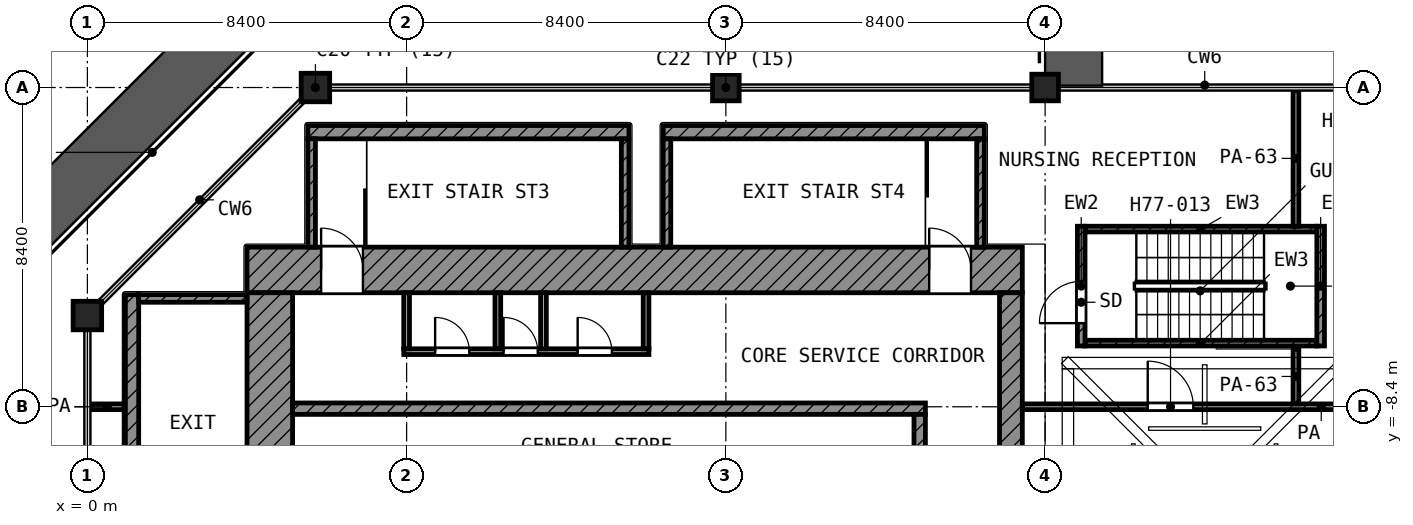
"""IFC4 building model, lengths in metres.
Left out: names, types, materials, properties, quantities, classifications, styles, units other than length and angle.
Written with IfcOpenShell. Run it as: python <this file> out.ifc"""

import sys

from ifc_helpers import new_model, si_unit, direction, frame, frame_2d, origin, origin_2d, place, context, subcontext, project, spatial, rectangle, extrude, element, fill, save


model = new_model("IFC4")
c1 = context("Model", 3, precision=1e-05, world=origin(), true_north=direction((0.0, 1.0)))
c2 = subcontext(c1, "Body", "Model", "MODEL_VIEW")
j1 = project(units=[si_unit("LENGTHUNIT", "METRE"), si_unit("PLANEANGLEUNIT", "RADIAN")], contexts=[c1])
p1 = place(None, origin())
s1 = spatial("IfcSite", under=j1, at=p1, CompositionType="ELEMENT")
p2 = place(p1, origin())
s2 = spatial("IfcBuilding", under=s1, at=p2, CompositionType="ELEMENT")
p3 = place(p2, frame((0.0, 0.0, 332.2)))
s3 = spatial("IfcBuildingStorey", under=s2, at=p3, CompositionType="ELEMENT", Elevation=332.2)
p4 = place(p3, frame((6.0, 0.0, 0.0), z_axis=(0.0, 0.0, 1.0), x_axis=(1.0, 0.0, 0.0)))
e1 = element("IfcColumn", 1, at=p4, inside=s3, PredefinedType="COLUMN", context=c2, shape_type="SweptSolid", body=[
    extrude(rectangle(XDim=0.75, YDim=0.75, at=origin_2d()), origin(), (0.0, 0.0, 1.0), 4.5),
])
for number, where, z_axis, x_axis in (
    (2, (16.8, 0.0, 0.0), (0.0, 0.0, 1.0), (1.0, 0.0, 0.0)),
    (3, (25.2, 0.0, 0.0), (0.0, 0.0, 1.0), (1.0, 0.0, 0.0)),
):
    element("IfcColumn", number, at=place(p3, frame(where, z_axis=z_axis, x_axis=x_axis)), inside=s3, PredefinedType="COLUMN", context=c2, shape_type="SweptSolid", body=[
        extrude(rectangle(XDim=0.7, YDim=0.7, at=origin_2d()), origin(), (0.0, 0.0, 1.0), 4.5),
    ])
p5 = place(p3, frame((0.0, -6.0, 0.0), z_axis=(0.0, 0.0, 1.0), x_axis=(1.0, 0.0, 0.0)))
e4 = element("IfcColumn", 4, at=p5, inside=s3, PredefinedType="COLUMN", context=c2, shape_type="SweptSolid", body=[
    extrude(rectangle(XDim=0.75, YDim=0.75, at=origin_2d()), origin(), (0.0, 0.0, 1.0), 4.5),
])
p6 = place(p3, frame((25.375, -0.125, 4.5), z_axis=(0.0, 0.0, 1.0), x_axis=(1.0, 0.0, 0.0)))
e5 = element("IfcWall", 5, at=p6, inside=s3, PredefinedType="SOLIDWALL", context=c2, shape_type="SweptSolid", body=[
    extrude(rectangle(XDim=13.853, YDim=0.25, at=frame_2d((6.926, 0.0))), origin(), (0.0, 0.0, 1.0), 1.1),
])
p7 = place(p3, frame((25.05, 0.683, 4.5), z_axis=(0.0, 0.0, 1.0), x_axis=(0.0, -1.0, 0.0)))
e6 = element("IfcWall", 6, at=p7, inside=s3, PredefinedType="SOLIDWALL", context=c2, shape_type="SweptSolid", body=[
    extrude(rectangle(XDim=0.551, YDim=0.25, at=frame_2d((0.275, 0.0))), origin(), (0.0, 0.0, 1.0), 1.1),
])
p8 = place(p3, frame((4.2, -4.8, 0.0), z_axis=(0.0, 0.0, 1.0), x_axis=(1.0, 0.0, 0.0)))
e7 = element("IfcWall", 7, at=p8, inside=s3, PredefinedType="SHEAR", context=c2, shape_type="SweptSolid", body=[
    extrude(rectangle(XDim=20.4, YDim=1.2, at=frame_2d((10.2, 0.0))), origin(), (0.0, 0.0, 1.0), 3.95),
])
p9 = place(p8, frame((1.95, 0.0, 0.0)))
e8 = element("IfcOpeningElement", 8, at=p9, cuts=e7, PredefinedType="OPENING", context=c2, shape_type="SweptSolid", body=[
    extrude(rectangle(XDim=1.1, YDim=2.1, at=frame_2d((0.55, 1.05))), frame((0.0, 0.61, 0.0), z_axis=(0.0, -1.0, 0.0), x_axis=(1.0, 0.0, 0.0)), (0.0, 0.0, 1.0), 1.22),
])
p10 = place(p8, frame((17.95, 0.0, 0.0)))
e9 = element("IfcOpeningElement", 9, at=p10, cuts=e7, PredefinedType="OPENING", context=c2, shape_type="SweptSolid", body=[
    extrude(rectangle(XDim=1.1, YDim=2.1, at=frame_2d((0.55, 1.05))), frame((0.0, 0.61, 0.0), z_axis=(0.0, -1.0, 0.0), x_axis=(1.0, 0.0, 0.0)), (0.0, 0.0, 1.0), 1.22),
])
p11 = place(p3, frame((4.8, -24.6, 0.0), z_axis=(0.0, 0.0, 1.0), x_axis=(0.0, 1.0, 0.0)))
e10 = element("IfcWall", 10, at=p11, inside=s3, PredefinedType="SHEAR", context=c2, shape_type="SweptSolid", body=[
    extrude(rectangle(XDim=19.2, YDim=1.2, at=frame_2d((9.6, 0.0))), origin(), (0.0, 0.0, 1.0), 3.95),
])
p12 = place(p11, frame((11.05, 0.0, 0.0)))
e11 = element("IfcOpeningElement", 11, at=p12, cuts=e10, PredefinedType="OPENING", context=c2, shape_type="SweptSolid", body=[
    extrude(rectangle(XDim=1.1, YDim=2.1, at=frame_2d((0.55, 1.05))), frame((0.0, 0.61, 0.0), z_axis=(0.0, -1.0, 0.0), x_axis=(1.0, 0.0, 0.0)), (0.0, 0.0, 1.0), 1.22),
])
p13 = place(p11, frame((1.75, 0.0, 0.0)))
e12 = element("IfcOpeningElement", 12, at=p13, cuts=e10, PredefinedType="OPENING", context=c2, shape_type="SweptSolid", body=[
    extrude(rectangle(XDim=1.1, YDim=2.1, at=frame_2d((0.55, 1.05))), frame((0.0, 0.61, 0.0), z_axis=(0.0, -1.0, 0.0), x_axis=(1.0, 0.0, 0.0)), (0.0, 0.0, 1.0), 1.22),
])
p14 = place(p3, frame((24.3, -24.0, 0.0), z_axis=(0.0, 0.0, 1.0), x_axis=(0.0, 1.0, 0.0)))
e13 = element("IfcWall", 13, at=p14, inside=s3, PredefinedType="SHEAR", context=c2, shape_type="SweptSolid", body=[
    extrude(rectangle(XDim=18.6, YDim=0.6, at=frame_2d((9.3, 0.0))), origin(), (0.0, 0.0, 1.0), 3.95),
])
p15 = place(p14, frame((10.5, 0.0, 0.0)))
e14 = element("IfcOpeningElement", 14, at=p15, cuts=e13, PredefinedType="OPENING", context=c2, shape_type="SweptSolid", body=[
    extrude(rectangle(XDim=1.8, YDim=2.1, at=frame_2d((0.9, 1.05))), frame((0.0, 0.31, 0.0), z_axis=(0.0, -1.0, 0.0), x_axis=(1.0, 0.0, 0.0)), (0.0, 0.0, 1.0), 0.62),
])
p16 = place(p3, frame((5.4, -8.45, 0.0), z_axis=(0.0, 0.0, 1.0), x_axis=(1.0, 0.0, 0.0)))
e15 = element("IfcWall", 15, at=p16, inside=s3, PredefinedType="SHEAR", context=c2, shape_type="SweptSolid", body=[
    extrude(rectangle(XDim=16.65, YDim=0.3, at=frame_2d((8.325, 0.0))), origin(), (0.0, 0.0, 1.0), 3.95),
])
p17 = place(p3, frame((21.9, -10.95, 0.0), z_axis=(0.0, 0.0, 1.0), x_axis=(0.0, 1.0, 0.0)))
e16 = element("IfcWall", 16, at=p17, inside=s3, PredefinedType="SHEAR", context=c2, shape_type="SweptSolid", body=[
    extrude(rectangle(XDim=2.35, YDim=0.3, at=frame_2d((1.175, 0.0))), origin(), (0.0, 0.0, 1.0), 3.95),
])
p18 = place(p3, frame((8.325, -6.95, 0.0), z_axis=(0.0, 0.0, 1.0), x_axis=(1.0, 0.0, 0.0)))
e17 = element("IfcWall", 17, at=p18, inside=s3, PredefinedType="PARTITIONING", context=c2, shape_type="SweptSolid", body=[
    extrude(rectangle(XDim=6.45, YDim=0.15, at=frame_2d((3.225, 0.0))), origin(), (0.0, 0.0, 1.0), 3.95),
])
p19 = place(p18, frame((0.825, 0.0, 0.0)))
e18 = element("IfcOpeningElement", 18, at=p19, cuts=e17, PredefinedType="OPENING", context=c2, shape_type="SweptSolid", body=[
    extrude(rectangle(XDim=0.9, YDim=2.1, at=frame_2d((0.45, 1.05))), frame((0.0, 0.085, 0.0), z_axis=(0.0, -1.0, 0.0), x_axis=(1.0, 0.0, 0.0)), (0.0, 0.0, 1.0), 0.17),
])
p20 = place(p18, frame((2.625, 0.0, 0.0)))
e19 = element("IfcOpeningElement", 19, at=p20, cuts=e17, PredefinedType="OPENING", context=c2, shape_type="SweptSolid", body=[
    extrude(rectangle(XDim=0.9, YDim=2.1, at=frame_2d((0.45, 1.05))), frame((0.0, 0.085, 0.0), z_axis=(0.0, -1.0, 0.0), x_axis=(1.0, 0.0, 0.0)), (0.0, 0.0, 1.0), 0.17),
])
p21 = place(p18, frame((4.575, 0.0, 0.0)))
e20 = element("IfcOpeningElement", 20, at=p21, cuts=e17, PredefinedType="OPENING", context=c2, shape_type="SweptSolid", body=[
    extrude(rectangle(XDim=0.9, YDim=2.1, at=frame_2d((0.45, 1.05))), frame((0.0, 0.085, 0.0), z_axis=(0.0, -1.0, 0.0), x_axis=(1.0, 0.0, 0.0)), (0.0, 0.0, 1.0), 0.17),
])
for number, where, z_axis, x_axis in (
    (21, (8.4, -6.875, 0.0), (0.0, 0.0, 1.0), (0.0, 1.0, 0.0)),
    (22, (10.8, -6.875, 0.0), (0.0, 0.0, 1.0), (0.0, 1.0, 0.0)),
    (23, (12.0, -6.875, 0.0), (0.0, 0.0, 1.0), (0.0, 1.0, 0.0)),
    (24, (14.7, -6.875, 0.0), (0.0, 0.0, 1.0), (0.0, 1.0, 0.0)),
):
    element("IfcWall", number, at=place(p3, frame(where, z_axis=z_axis, x_axis=x_axis)), inside=s3, PredefinedType="PARTITIONING", context=c2, shape_type="SweptSolid", body=[
        extrude(rectangle(XDim=1.475, YDim=0.15, at=frame_2d((0.738, 0.0))), origin(), (0.0, 0.0, 1.0), 3.95),
    ])
p22 = place(p3, frame((1.175, -13.9, 0.0), z_axis=(0.0, 0.0, 1.0), x_axis=(0.0, 1.0, 0.0)))
e25 = element("IfcWall", 25, at=p22, inside=s3, PredefinedType="SHEAR", context=c2, shape_type="SweptSolid", body=[
    extrude(rectangle(XDim=8.45, YDim=0.35, at=frame_2d((4.225, 0.0))), origin(), (0.0, 0.0, 1.0), 3.95),
])
p23 = place(p3, frame((1.35, -5.55, 0.0), z_axis=(0.0, 0.0, 1.0), x_axis=(1.0, 0.0, 0.0)))
e26 = element("IfcWall", 26, at=p23, inside=s3, PredefinedType="SHEAR", context=c2, shape_type="SweptSolid", body=[
    extrude(rectangle(XDim=2.85, YDim=0.2, at=frame_2d((1.425, 0.0))), origin(), (0.0, 0.0, 1.0), 3.95),
])
p24 = place(p3, frame((5.8, -1.175, 0.0), z_axis=(0.0, 0.0, 1.0), x_axis=(1.0, 0.0, 0.0)))
e27 = element("IfcWall", 27, at=p24, inside=s3, PredefinedType="SHEAR", context=c2, shape_type="SweptSolid", body=[
    extrude(rectangle(XDim=8.45, YDim=0.35, at=frame_2d((4.225, 0.0))), origin(), (0.0, 0.0, 1.0), 3.95),
])
for number, where, z_axis, x_axis in (
    (28, (5.9, -4.2, 0.0), (0.0, 0.0, 1.0), (0.0, 1.0, 0.0)),
    (29, (14.15, -4.2, 0.0), (0.0, 0.0, 1.0), (0.0, 1.0, 0.0)),
):
    element("IfcWall", number, at=place(p3, frame(where, z_axis=z_axis, x_axis=x_axis)), inside=s3, PredefinedType="SHEAR", context=c2, shape_type="SweptSolid", body=[
        extrude(rectangle(XDim=2.85, YDim=0.2, at=frame_2d((1.425, 0.0))), origin(), (0.0, 0.0, 1.0), 3.95),
    ])
p25 = place(p3, frame((15.15, -1.175, 0.0), z_axis=(0.0, 0.0, 1.0), x_axis=(1.0, 0.0, 0.0)))
e30 = element("IfcWall", 30, at=p25, inside=s3, PredefinedType="SHEAR", context=c2, shape_type="SweptSolid", body=[
    extrude(rectangle(XDim=8.45, YDim=0.35, at=frame_2d((4.225, 0.0))), origin(), (0.0, 0.0, 1.0), 3.95),
])
for number, where, z_axis, x_axis in (
    (31, (15.25, -4.2, 0.0), (0.0, 0.0, 1.0), (0.0, 1.0, 0.0)),
    (32, (23.5, -4.2, 0.0), (0.0, 0.0, 1.0), (0.0, 1.0, 0.0)),
):
    element("IfcWall", number, at=place(p3, frame(where, z_axis=z_axis, x_axis=x_axis)), inside=s3, PredefinedType="SHEAR", context=c2, shape_type="SweptSolid", body=[
        extrude(rectangle(XDim=2.85, YDim=0.2, at=frame_2d((1.425, 0.0))), origin(), (0.0, 0.0, 1.0), 3.95),
    ])
p26 = place(p3, frame((26.15, -6.8, 0.0), z_axis=(0.0, 0.0, 1.0), x_axis=(0.0, 1.0, 0.0)))
e33 = element("IfcWall", 33, at=p26, inside=s3, PredefinedType="SHEAR", context=c2, shape_type="SweptSolid", body=[
    extrude(rectangle(XDim=3.15, YDim=0.2, at=frame_2d((1.575, 0.0))), origin(), (0.0, 0.0, 1.0), 3.95),
])
p27 = place(p26, frame((0.6, 0.0, 0.0)))
e34 = element("IfcOpeningElement", 34, at=p27, cuts=e33, PredefinedType="OPENING", context=c2, shape_type="SweptSolid", body=[
    extrude(rectangle(XDim=1.1, YDim=2.1, at=frame_2d((0.55, 1.05))), frame((0.0, 0.11, 0.0), z_axis=(0.0, -1.0, 0.0), x_axis=(1.0, 0.0, 0.0)), (0.0, 0.0, 1.0), 0.22),
])
p28 = place(p3, frame((32.45, -6.8, 0.0), z_axis=(0.0, 0.0, 1.0), x_axis=(0.0, 1.0, 0.0)))
e35 = element("IfcWall", 35, at=p28, inside=s3, PredefinedType="SHEAR", context=c2, shape_type="SweptSolid", body=[
    extrude(rectangle(XDim=3.15, YDim=0.2, at=frame_2d((1.575, 0.0))), origin(), (0.0, 0.0, 1.0), 3.95),
])
for number, where, z_axis, x_axis in (
    (36, (26.25, -3.725, 0.0), (0.0, 0.0, 1.0), (1.0, 0.0, 0.0)),
    (37, (26.25, -6.725, 0.0), (0.0, 0.0, 1.0), (1.0, 0.0, 0.0)),
):
    element("IfcWall", number, at=place(p3, frame(where, z_axis=z_axis, x_axis=x_axis)), inside=s3, PredefinedType="SHEAR", context=c2, shape_type="SweptSolid", body=[
        extrude(rectangle(XDim=6.1, YDim=0.15, at=frame_2d((3.05, 0.0))), origin(), (0.0, 0.0, 1.0), 3.95),
    ])
p29 = place(p3, frame((0.08, -8.4, 0.0), z_axis=(0.0, 0.0, 1.0), x_axis=(1.0, 0.0, 0.0)))
e38 = element("IfcWall", 38, at=p29, inside=s3, PredefinedType="PARTITIONING", context=c2, shape_type="SweptSolid", body=[
    extrude(rectangle(XDim=0.89, YDim=0.15, at=frame_2d((0.445, 0.0))), origin(), (0.0, 0.0, 1.0), 3.95),
])
p30 = place(p3, frame((24.6, -8.4, 0.0), z_axis=(0.0, 0.0, 1.0), x_axis=(1.0, 0.0, 0.0)))
e39 = element("IfcWall", 39, at=p30, inside=s3, PredefinedType="PARTITIONING", context=c2, shape_type="SweptSolid", body=[
    extrude(rectangle(XDim=15.732, YDim=0.15, at=frame_2d((7.866, 0.0))), origin(), (0.0, 0.0, 1.0), 3.95),
])
p31 = place(p30, frame((3.3, 0.0, 0.0)))
e40 = element("IfcOpeningElement", 40, at=p31, cuts=e39, PredefinedType="OPENING", context=c2, shape_type="SweptSolid", body=[
    extrude(rectangle(XDim=1.2, YDim=2.1, at=frame_2d((0.6, 1.05))), frame((0.0, 0.085, 0.0), z_axis=(0.0, -1.0, 0.0), x_axis=(1.0, 0.0, 0.0)), (0.0, 0.0, 1.0), 0.17),
])
p32 = place(p30, frame((9.419, 0.0, 0.0)))
e41 = element("IfcOpeningElement", 41, at=p32, cuts=e39, PredefinedType="OPENING", context=c2, shape_type="SweptSolid", body=[
    extrude(rectangle(XDim=1.5, YDim=2.1, at=frame_2d((0.75, 1.05))), frame((0.0, 0.085, 0.0), z_axis=(0.0, -1.0, 0.0), x_axis=(1.0, 0.0, 0.0)), (0.0, 0.0, 1.0), 0.17),
])
p33 = place(p30, frame((12.188, 0.0, 0.0)))
e42 = element("IfcOpeningElement", 42, at=p33, cuts=e39, PredefinedType="OPENING", context=c2, shape_type="SweptSolid", body=[
    extrude(rectangle(XDim=1.5, YDim=2.1, at=frame_2d((0.75, 1.05))), frame((0.0, 0.085, 0.0), z_axis=(0.0, -1.0, 0.0), x_axis=(1.0, 0.0, 0.0)), (0.0, 0.0, 1.0), 0.17),
])
p34 = place(p3, frame((31.8, -8.325, 0.0), z_axis=(0.0, 0.0, 1.0), x_axis=(0.0, 1.0, 0.0)))
e43 = element("IfcWall", 43, at=p34, inside=s3, PredefinedType="PARTITIONING", context=c2, shape_type="SweptSolid", body=[
    extrude(rectangle(XDim=1.445, YDim=0.15, at=frame_2d((0.723, 0.0))), origin(), (0.0, 0.0, 1.0), 2.85),
])
p35 = place(p3, frame((31.8, -3.65, 0.0), z_axis=(0.0, 0.0, 1.0), x_axis=(0.0, 1.0, 0.0)))
e44 = element("IfcWall", 44, at=p35, inside=s3, PredefinedType="PARTITIONING", context=c2, shape_type="SweptSolid", body=[
    extrude(rectangle(XDim=3.57, YDim=0.15, at=frame_2d((1.785, 0.0))), origin(), (0.0, 0.0, 1.0), 2.85),
])
p36 = place(p9, origin())
e45 = element("IfcDoor", 45, at=p36, inside=s3, OperationType="SINGLE_SWING_LEFT", PredefinedType="DOOR", context=c2, shape_type="SweptSolid", body=[
    extrude(rectangle(XDim=1.1, YDim=2.1, at=frame_2d((0.55, 1.05))), frame((0.0, 0.025, 0.0), z_axis=(0.0, -1.0, 0.0), x_axis=(1.0, 0.0, 0.0)), (0.0, 0.0, 1.0), 0.05),
])
fill(e8, e45)
p37 = place(p10, origin())
e46 = element("IfcDoor", 46, at=p37, inside=s3, OperationType="SINGLE_SWING_LEFT", PredefinedType="DOOR", context=c2, shape_type="SweptSolid", body=[
    extrude(rectangle(XDim=1.1, YDim=2.1, at=frame_2d((0.55, 1.05))), frame((0.0, 0.025, 0.0), z_axis=(0.0, -1.0, 0.0), x_axis=(1.0, 0.0, 0.0)), (0.0, 0.0, 1.0), 0.05),
])
fill(e9, e46)
p38 = place(p19, origin())
e47 = element("IfcDoor", 47, at=p38, inside=s3, OperationType="SINGLE_SWING_LEFT", PredefinedType="DOOR", context=c2, shape_type="SweptSolid", body=[
    extrude(rectangle(XDim=0.9, YDim=2.1, at=frame_2d((0.45, 1.05))), frame((0.0, 0.025, 0.0), z_axis=(0.0, -1.0, 0.0), x_axis=(1.0, 0.0, 0.0)), (0.0, 0.0, 1.0), 0.05),
])
fill(e18, e47)
p39 = place(p20, origin())
e48 = element("IfcDoor", 48, at=p39, inside=s3, OperationType="SINGLE_SWING_LEFT", PredefinedType="DOOR", context=c2, shape_type="SweptSolid", body=[
    extrude(rectangle(XDim=0.9, YDim=2.1, at=frame_2d((0.45, 1.05))), frame((0.0, 0.025, 0.0), z_axis=(0.0, -1.0, 0.0), x_axis=(1.0, 0.0, 0.0)), (0.0, 0.0, 1.0), 0.05),
])
fill(e19, e48)
p40 = place(p21, origin())
e49 = element("IfcDoor", 49, at=p40, inside=s3, OperationType="SINGLE_SWING_LEFT", PredefinedType="DOOR", context=c2, shape_type="SweptSolid", body=[
    extrude(rectangle(XDim=0.9, YDim=2.1, at=frame_2d((0.45, 1.05))), frame((0.0, 0.025, 0.0), z_axis=(0.0, -1.0, 0.0), x_axis=(1.0, 0.0, 0.0)), (0.0, 0.0, 1.0), 0.05),
])
fill(e20, e49)
p41 = place(p27, origin())
e50 = element("IfcDoor", 50, at=p41, inside=s3, OperationType="SINGLE_SWING_LEFT", PredefinedType="DOOR", context=c2, shape_type="SweptSolid", body=[
    extrude(rectangle(XDim=1.1, YDim=2.1, at=frame_2d((0.55, 1.05))), frame((0.0, 0.025, 0.0), z_axis=(0.0, -1.0, 0.0), x_axis=(1.0, 0.0, 0.0)), (0.0, 0.0, 1.0), 0.05),
])
fill(e34, e50)
p42 = place(p31, origin())
e51 = element("IfcDoor", 51, at=p42, inside=s3, OperationType="SINGLE_SWING_LEFT", PredefinedType="DOOR", context=c2, shape_type="SweptSolid", body=[
    extrude(rectangle(XDim=1.2, YDim=2.1, at=frame_2d((0.6, 1.05))), frame((0.0, 0.025, 0.0), z_axis=(0.0, -1.0, 0.0), x_axis=(1.0, 0.0, 0.0)), (0.0, 0.0, 1.0), 0.05),
])
fill(e40, e51)
save(model, sys.argv[1])
